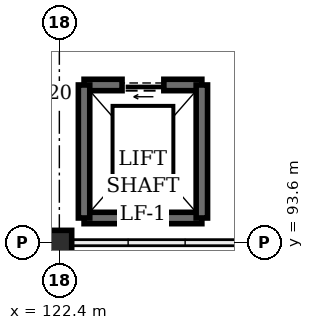
"""IFC4 building model, lengths in metres.
Left out: names, types, materials, properties, quantities, classifications, styles, units other than length and angle.
Written with IfcOpenShell. Run it as: python <this file> out.ifc"""

import sys

from ifc_helpers import new_model, si_unit, direction, frame, frame_2d, origin, origin_2d, place, context, subcontext, project, spatial, rectangle, extrude, element, fill, save


model = new_model("IFC4")
c1 = context("Model", 3, precision=1e-05, world=origin(), true_north=direction((0.0, 1.0)))
c2 = subcontext(c1, "Body", "Model", "MODEL_VIEW")
j1 = project(units=[si_unit("LENGTHUNIT", "METRE"), si_unit("PLANEANGLEUNIT", "RADIAN")], contexts=[c1])
p1 = place(None, origin())
s1 = spatial("IfcSite", under=j1, at=p1, CompositionType="ELEMENT")
p2 = place(p1, origin())
s2 = spatial("IfcBuilding", under=s1, at=p2, CompositionType="ELEMENT")
p3 = place(p2, frame((0.0, 0.0, 6.0)))
s3 = spatial("IfcBuildingStorey", under=s2, at=p3, CompositionType="ELEMENT", Elevation=6.0)
p4 = place(p3, frame((122.4, 93.6, 0.0), z_axis=(0.0, 0.0, 1.0), x_axis=(1.0, 0.0, 0.0)))
e1 = element("IfcColumn", 1, at=p4, inside=s3, PredefinedType="COLUMN", context=c2, shape_type="SweptSolid", body=[
    extrude(rectangle(XDim=0.65, YDim=0.65, at=origin_2d()), origin(), (0.0, 0.0, 1.0), 4.2),
])
p5 = place(p3, frame((123.05, 94.25, 0.0), z_axis=(0.0, 0.0, 1.0), x_axis=(1.0, 0.0, 0.0)))
e2 = element("IfcWall", 2, at=p5, inside=s3, PredefinedType="SHEAR", context=c2, shape_type="SweptSolid", body=[
    extrude(rectangle(XDim=3.1, YDim=0.3, at=frame_2d((1.55, 0.0))), origin(), (0.0, 0.0, 1.0), 3.94),
])
p6 = place(p3, frame((126.15, 97.75, 0.0), z_axis=(0.0, 0.0, 1.0), x_axis=(-1.0, 0.0, 0.0)))
e3 = element("IfcWall", 3, at=p6, inside=s3, PredefinedType="SHEAR", context=c2, shape_type="SweptSolid", body=[
    extrude(rectangle(XDim=3.1, YDim=0.3, at=frame_2d((1.55, 0.0))), origin(), (0.0, 0.0, 1.0), 3.94),
])
p7 = place(p6, frame((1.0, 0.0, 0.0)))
e4 = element("IfcOpeningElement", 4, at=p7, cuts=e3, PredefinedType="OPENING", context=c2, shape_type="SweptSolid", body=[
    extrude(rectangle(XDim=1.1, YDim=2.22, at=frame_2d((0.55, 1.11))), frame((0.0, 0.16, 0.0), z_axis=(0.0, -1.0, 0.0), x_axis=(1.0, 0.0, 0.0)), (0.0, 0.0, 1.0), 0.32),
])
for number, where, z_axis, x_axis in (
    (5, (123.05, 97.75, 0.0), (0.0, 0.0, 1.0), (0.0, -1.0, 0.0)),
    (6, (126.15, 94.25, 0.0), (0.0, 0.0, 1.0), (0.0, 1.0, 0.0)),
):
    element("IfcWall", number, at=place(p3, frame(where, z_axis=z_axis, x_axis=x_axis)), inside=s3, PredefinedType="SHEAR", context=c2, shape_type="SweptSolid", body=[
        extrude(rectangle(XDim=3.5, YDim=0.3, at=frame_2d((1.75, 0.0))), origin(), (0.0, 0.0, 1.0), 3.94),
    ])
p8 = place(p7, origin())
e7 = element("IfcDoor", 7, at=p8, inside=s3, OperationType="SLIDING_TO_LEFT", PredefinedType="DOOR", context=c2, shape_type="SweptSolid", body=[
    extrude(rectangle(XDim=1.1, YDim=2.22, at=frame_2d((0.55, 1.11))), frame((0.0, 0.025, 0.0), z_axis=(0.0, -1.0, 0.0), x_axis=(1.0, 0.0, 0.0)), (0.0, 0.0, 1.0), 0.05),
])
fill(e4, e7)
save(model, sys.argv[1])
